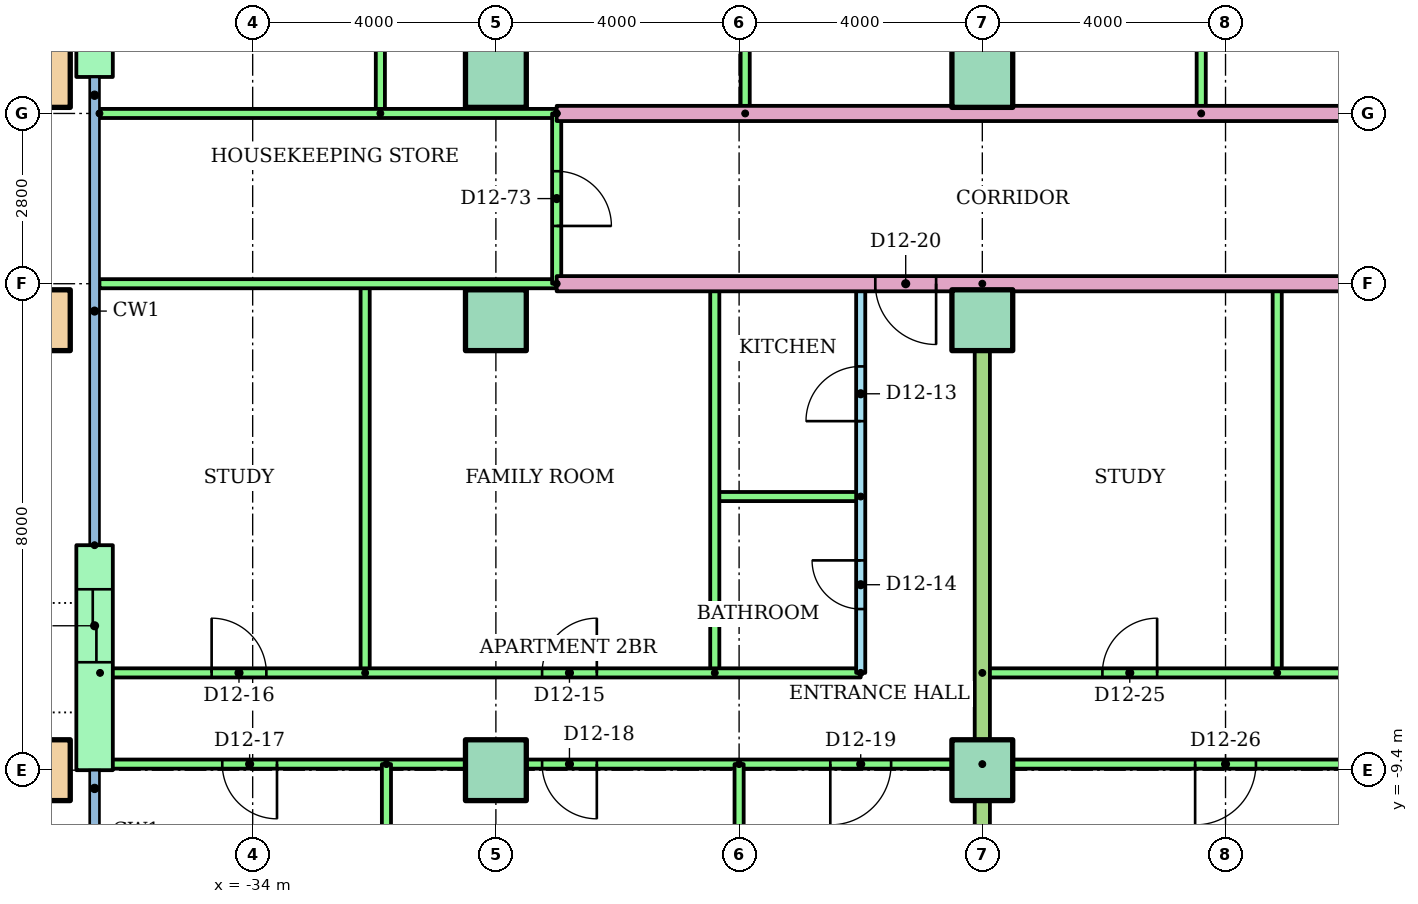
"""IFC4 building model, lengths in metres.
Left out: names, types, materials, properties, quantities, classifications, styles, units other than length and angle.
Written with IfcOpenShell. Run it as: python <this file> out.ifc"""

import sys

from ifc_helpers import new_model, si_unit, direction, frame, frame_2d, origin, origin_2d, place, context, subcontext, project, spatial, rectangle, hollow_rectangle, extrude, element, fill, save


model = new_model("IFC4")
c1 = context("Model", 3, precision=1e-05, world=origin(), true_north=direction((0.0, 1.0)))
c2 = subcontext(c1, "Body", "Model", "MODEL_VIEW")
j1 = project(units=[si_unit("LENGTHUNIT", "METRE"), si_unit("PLANEANGLEUNIT", "RADIAN")], contexts=[c1])
p1 = place(None, origin())
s1 = spatial("IfcSite", under=j1, at=p1, CompositionType="ELEMENT")
p2 = place(p1, origin())
s2 = spatial("IfcBuilding", under=s1, at=p2, CompositionType="ELEMENT")
p3 = place(p2, frame((0.0, 0.0, 48.0)))
s3 = spatial("IfcBuildingStorey", under=s2, at=p3, CompositionType="ELEMENT", Elevation=48.0)
p4 = place(p3, frame((-37.5, -9.4, 0.0)))
e1 = element("IfcColumn", 1, at=p4, inside=s3, PredefinedType="COLUMN", context=c2, shape_type="SweptSolid", body=[
    extrude(hollow_rectangle(XDim=1.0, YDim=1.0, WallThickness=0.05, at=origin_2d()), origin(), (0.0, 0.0, 1.0), 3.2),
])
for number, where in (
    (2, (-30.0, -9.4, 0.0)),
    (3, (-22.0, -9.4, 0.0)),
):
    element("IfcColumn", number, at=place(p3, frame(where)), inside=s3, PredefinedType="COLUMN", context=c2, shape_type="SweptSolid", body=[
        extrude(rectangle(XDim=1.0, YDim=1.0, at=origin_2d()), origin(), (0.0, 0.0, 1.0), 3.2),
    ])
p5 = place(p3, frame((-37.5, -2.0, 0.0)))
e4 = element("IfcColumn", 4, at=p5, inside=s3, PredefinedType="COLUMN", context=c2, shape_type="SweptSolid", body=[
    extrude(hollow_rectangle(XDim=1.0, YDim=1.0, WallThickness=0.05, at=origin_2d()), origin(), (0.0, 0.0, 1.0), 3.2),
])
for number, where in (
    (5, (-30.0, -2.0, 0.0)),
    (6, (-22.0, -2.0, 0.0)),
):
    element("IfcColumn", number, at=place(p3, frame(where)), inside=s3, PredefinedType="COLUMN", context=c2, shape_type="SweptSolid", body=[
        extrude(rectangle(XDim=1.0, YDim=1.0, at=origin_2d()), origin(), (0.0, 0.0, 1.0), 3.2),
    ])
p6 = place(p3, frame((-37.5, 2.0, 0.0)))
e7 = element("IfcColumn", 7, at=p6, inside=s3, PredefinedType="COLUMN", context=c2, shape_type="SweptSolid", body=[
    extrude(hollow_rectangle(XDim=1.0, YDim=1.0, WallThickness=0.05, at=origin_2d()), origin(), (0.0, 0.0, 1.0), 3.2),
])
for number, where in (
    (8, (-30.0, 2.0, 0.0)),
    (9, (-22.0, 2.0, 0.0)),
):
    element("IfcColumn", number, at=place(p3, frame(where)), inside=s3, PredefinedType="COLUMN", context=c2, shape_type="SweptSolid", body=[
        extrude(rectangle(XDim=1.0, YDim=1.0, at=origin_2d()), origin(), (0.0, 0.0, 1.0), 3.2),
    ])
p7 = place(p3, frame((-36.6, 6.5, 0.0), z_axis=(0.0, 0.0, 1.0), x_axis=(0.0, -1.0, 0.0)))
e10 = element("IfcWall", 10, at=p7, inside=s3, PredefinedType="STANDARD", context=c2, shape_type="SweptSolid", body=[
    extrude(rectangle(XDim=4.5, YDim=0.6, at=frame_2d((2.25, 0.0))), origin(), (0.0, 0.0, 1.0), 2.92),
])
p8 = place(p7, frame((1.65, 0.0, 0.0)))
e11 = element("IfcOpeningElement", 11, at=p8, cuts=e10, PredefinedType="OPENING", context=c2, shape_type="SweptSolid", body=[
    extrude(rectangle(XDim=1.2, YDim=2.1, at=frame_2d((0.6, 1.05))), frame((0.0, 0.31, 0.0), z_axis=(0.0, -1.0, 0.0), x_axis=(1.0, 0.0, 0.0)), (0.0, 0.0, 1.0), 0.62),
])
p9 = place(p3, frame((-36.6, -5.7, 0.0), z_axis=(0.0, 0.0, 1.0), x_axis=(0.0, -1.0, 0.0)))
e12 = element("IfcWall", 12, at=p9, inside=s3, PredefinedType="STANDARD", context=c2, shape_type="SweptSolid", body=[
    extrude(rectangle(XDim=3.7, YDim=0.6, at=frame_2d((1.85, 0.0))), origin(), (0.0, 0.0, 1.0), 2.92),
])
p10 = place(p9, frame((0.725, 0.0, 0.0)))
e13 = element("IfcOpeningElement", 13, at=p10, cuts=e12, PredefinedType="OPENING", context=c2, shape_type="SweptSolid", body=[
    extrude(rectangle(XDim=1.2, YDim=2.1, at=frame_2d((0.6, 1.05))), frame((0.0, 0.31, 0.0), z_axis=(0.0, -1.0, 0.0), x_axis=(1.0, 0.0, 0.0)), (0.0, 0.0, 1.0), 0.62),
])
p11 = place(p3, frame((-24.0, -7.8, 0.0), z_axis=(0.0, 0.0, 1.0), x_axis=(0.0, 1.0, 0.0)))
e14 = element("IfcWall", 14, at=p11, inside=s3, PredefinedType="PARTITIONING", context=c2, shape_type="SweptSolid", body=[
    extrude(rectangle(XDim=6.4, YDim=0.15, at=frame_2d((3.2, 0.0))), origin(), (0.0, 0.0, 1.0), 2.4),
])
p12 = place(p11, frame((4.14, 0.0, 0.0)))
e15 = element("IfcOpeningElement", 15, at=p12, cuts=e14, PredefinedType="OPENING", context=c2, shape_type="SweptSolid", body=[
    extrude(rectangle(XDim=0.9, YDim=2.1, at=frame_2d((0.45, 1.05))), frame((0.0, 0.085, 0.0), z_axis=(0.0, -1.0, 0.0), x_axis=(1.0, 0.0, 0.0)), (0.0, 0.0, 1.0), 0.17),
])
p13 = place(p11, frame((1.05, 0.0, 0.0)))
e16 = element("IfcOpeningElement", 16, at=p13, cuts=e14, PredefinedType="OPENING", context=c2, shape_type="SweptSolid", body=[
    extrude(rectangle(XDim=0.8, YDim=2.1, at=frame_2d((0.4, 1.05))), frame((0.0, 0.085, 0.0), z_axis=(0.0, -1.0, 0.0), x_axis=(1.0, 0.0, 0.0)), (0.0, 0.0, 1.0), 0.17),
])
p14 = place(p3, frame((-24.0, -4.9, 0.0), z_axis=(0.0, 0.0, 1.0), x_axis=(-1.0, 0.0, 0.0)))
e17 = element("IfcWall", 17, at=p14, inside=s3, PredefinedType="PARTITIONING", context=c2, shape_type="SweptSolid", body=[
    extrude(rectangle(XDim=2.4, YDim=0.15, at=frame_2d((1.2, 0.0))), origin(), (0.0, 0.0, 1.0), 2.4),
])
for number, where, z_axis, x_axis in (
    (18, (-26.4, -7.8, 0.0), (0.0, 0.0, 1.0), (0.0, 1.0, 0.0)),
    (19, (-32.15, -7.8, 0.0), (0.0, 0.0, 1.0), (0.0, 1.0, 0.0)),
):
    element("IfcWall", number, at=place(p3, frame(where, z_axis=z_axis, x_axis=x_axis)), inside=s3, PredefinedType="PARTITIONING", context=c2, shape_type="SweptSolid", body=[
        extrude(rectangle(XDim=6.4, YDim=0.15, at=frame_2d((3.2, 0.0))), origin(), (0.0, 0.0, 1.0), 2.4),
    ])
p15 = place(p3, frame((-36.51, -7.8, 0.0)))
e20 = element("IfcWall", 20, at=p15, inside=s3, PredefinedType="PARTITIONING", context=c2, shape_type="SweptSolid", body=[
    extrude(rectangle(XDim=12.51, YDim=0.15, at=frame_2d((6.255, 0.0))), origin(), (0.0, 0.0, 1.0), 2.4),
])
p16 = place(p15, frame((7.27, 0.0, 0.0)))
e21 = element("IfcOpeningElement", 21, at=p16, cuts=e20, PredefinedType="OPENING", context=c2, shape_type="SweptSolid", body=[
    extrude(rectangle(XDim=0.9, YDim=2.1, at=frame_2d((0.45, 1.05))), frame((0.0, 0.085, 0.0), z_axis=(0.0, -1.0, 0.0), x_axis=(1.0, 0.0, 0.0)), (0.0, 0.0, 1.0), 0.17),
])
p17 = place(p15, frame((1.835, 0.0, 0.0)))
e22 = element("IfcOpeningElement", 22, at=p17, cuts=e20, PredefinedType="OPENING", context=c2, shape_type="SweptSolid", body=[
    extrude(rectangle(XDim=0.9, YDim=2.1, at=frame_2d((0.45, 1.05))), frame((0.0, 0.085, 0.0), z_axis=(0.0, -1.0, 0.0), x_axis=(1.0, 0.0, 0.0)), (0.0, 0.0, 1.0), 0.17),
])
p18 = place(p3, frame((-22.0, -9.3, 0.0), z_axis=(0.0, 0.0, 1.0), x_axis=(-1.0, 0.0, 0.0)))
e23 = element("IfcWall", 23, at=p18, inside=s3, PredefinedType="PARTITIONING", context=c2, shape_type="SweptSolid", body=[
    extrude(rectangle(XDim=14.51, YDim=0.15, at=frame_2d((7.255, 0.0))), origin(), (0.0, 0.0, 1.0), 2.4),
])
p19 = place(p18, frame((11.6, 0.0, 0.0)))
e24 = element("IfcOpeningElement", 24, at=p19, cuts=e23, PredefinedType="OPENING", context=c2, shape_type="SweptSolid", body=[
    extrude(rectangle(XDim=0.9, YDim=2.1, at=frame_2d((0.45, 1.05))), frame((0.0, 0.085, 0.0), z_axis=(0.0, -1.0, 0.0), x_axis=(1.0, 0.0, 0.0)), (0.0, 0.0, 1.0), 0.17),
])
p20 = place(p18, frame((6.34, 0.0, 0.0)))
e25 = element("IfcOpeningElement", 25, at=p20, cuts=e23, PredefinedType="OPENING", context=c2, shape_type="SweptSolid", body=[
    extrude(rectangle(XDim=0.9, YDim=2.1, at=frame_2d((0.45, 1.05))), frame((0.0, 0.085, 0.0), z_axis=(0.0, -1.0, 0.0), x_axis=(1.0, 0.0, 0.0)), (0.0, 0.0, 1.0), 0.17),
])
p21 = place(p18, frame((1.5, 0.0, 0.0)))
e26 = element("IfcOpeningElement", 26, at=p21, cuts=e23, PredefinedType="OPENING", context=c2, shape_type="SweptSolid", body=[
    extrude(rectangle(XDim=1.0, YDim=2.1, at=frame_2d((0.5, 1.05))), frame((0.0, 0.085, 0.0), z_axis=(0.0, -1.0, 0.0), x_axis=(1.0, 0.0, 0.0)), (0.0, 0.0, 1.0), 0.17),
])
p22 = place(p3, frame((-31.8, -9.3, 0.0), z_axis=(0.0, 0.0, 1.0), x_axis=(0.0, -1.0, 0.0)))
e27 = element("IfcWall", 27, at=p22, inside=s3, PredefinedType="PARTITIONING", context=c2, shape_type="SweptSolid", body=[
    extrude(rectangle(XDim=5.02, YDim=0.15, at=frame_2d((2.51, 0.0))), origin(), (0.0, 0.0, 1.0), 2.4),
])
p23 = place(p3, frame((-26.0, -9.3, 0.0), z_axis=(0.0, 0.0, 1.0), x_axis=(0.0, -1.0, 0.0)))
e28 = element("IfcWall", 28, at=p23, inside=s3, PredefinedType="PARTITIONING", context=c2, shape_type="SweptSolid", body=[
    extrude(rectangle(XDim=6.821, YDim=0.15, at=frame_2d((3.411, 0.0))), origin(), (0.0, 0.0, 1.0), 2.4),
])
p24 = place(p3, frame((-17.15, -7.8, 0.0), z_axis=(0.0, 0.0, 1.0), x_axis=(0.0, 1.0, 0.0)))
e29 = element("IfcWall", 29, at=p24, inside=s3, PredefinedType="PARTITIONING", context=c2, shape_type="SweptSolid", body=[
    extrude(rectangle(XDim=6.4, YDim=0.15, at=frame_2d((3.2, 0.0))), origin(), (0.0, 0.0, 1.0), 2.4),
])
p25 = place(p3, frame((-22.0, -7.8, 0.0)))
e30 = element("IfcWall", 30, at=p25, inside=s3, PredefinedType="PARTITIONING", context=c2, shape_type="SweptSolid", body=[
    extrude(rectangle(XDim=22.0, YDim=0.15, at=frame_2d((11.0, 0.0))), origin(), (0.0, 0.0, 1.0), 2.4),
])
p26 = place(p25, frame((14.34, 0.0, 0.0)))
e31 = element("IfcOpeningElement", 31, at=p26, cuts=e30, PredefinedType="OPENING", context=c2, shape_type="SweptSolid", body=[
    extrude(rectangle(XDim=0.9, YDim=2.1, at=frame_2d((0.45, 1.05))), frame((0.0, 0.085, 0.0), z_axis=(0.0, -1.0, 0.0), x_axis=(1.0, 0.0, 0.0)), (0.0, 0.0, 1.0), 0.17),
])
p27 = place(p25, frame((8.76, 0.0, 0.0)))
e32 = element("IfcOpeningElement", 32, at=p27, cuts=e30, PredefinedType="OPENING", context=c2, shape_type="SweptSolid", body=[
    extrude(rectangle(XDim=0.9, YDim=2.1, at=frame_2d((0.45, 1.05))), frame((0.0, 0.085, 0.0), z_axis=(0.0, -1.0, 0.0), x_axis=(1.0, 0.0, 0.0)), (0.0, 0.0, 1.0), 0.17),
])
p28 = place(p25, frame((1.975, 0.0, 0.0)))
e33 = element("IfcOpeningElement", 33, at=p28, cuts=e30, PredefinedType="OPENING", context=c2, shape_type="SweptSolid", body=[
    extrude(rectangle(XDim=0.9, YDim=2.1, at=frame_2d((0.45, 1.05))), frame((0.0, 0.085, 0.0), z_axis=(0.0, -1.0, 0.0), x_axis=(1.0, 0.0, 0.0)), (0.0, 0.0, 1.0), 0.17),
])
p29 = place(p3, frame((2.0, -9.3, 0.0), z_axis=(0.0, 0.0, 1.0), x_axis=(-1.0, 0.0, 0.0)))
e34 = element("IfcWall", 34, at=p29, inside=s3, PredefinedType="PARTITIONING", context=c2, shape_type="SweptSolid", body=[
    extrude(rectangle(XDim=24.0, YDim=0.15, at=frame_2d((12.0, 0.0))), origin(), (0.0, 0.0, 1.0), 2.4),
])
p30 = place(p29, frame((19.5, 0.0, 0.0)))
e35 = element("IfcOpeningElement", 35, at=p30, cuts=e34, PredefinedType="OPENING", context=c2, shape_type="SweptSolid", body=[
    extrude(rectangle(XDim=1.0, YDim=2.1, at=frame_2d((0.5, 1.05))), frame((0.0, 0.085, 0.0), z_axis=(0.0, -1.0, 0.0), x_axis=(1.0, 0.0, 0.0)), (0.0, 0.0, 1.0), 0.17),
])
p31 = place(p29, frame((13.55, 0.0, 0.0)))
e36 = element("IfcOpeningElement", 36, at=p31, cuts=e34, PredefinedType="OPENING", context=c2, shape_type="SweptSolid", body=[
    extrude(rectangle(XDim=0.9, YDim=2.1, at=frame_2d((0.45, 1.05))), frame((0.0, 0.085, 0.0), z_axis=(0.0, -1.0, 0.0), x_axis=(1.0, 0.0, 0.0)), (0.0, 0.0, 1.0), 0.17),
])
p32 = place(p29, frame((9.55, 0.0, 0.0)))
e37 = element("IfcOpeningElement", 37, at=p32, cuts=e34, PredefinedType="OPENING", context=c2, shape_type="SweptSolid", body=[
    extrude(rectangle(XDim=0.9, YDim=2.1, at=frame_2d((0.45, 1.05))), frame((0.0, 0.085, 0.0), z_axis=(0.0, -1.0, 0.0), x_axis=(1.0, 0.0, 0.0)), (0.0, 0.0, 1.0), 0.17),
])
p33 = place(p29, frame((5.55, 0.0, 0.0)))
e38 = element("IfcOpeningElement", 38, at=p33, cuts=e34, PredefinedType="OPENING", context=c2, shape_type="SweptSolid", body=[
    extrude(rectangle(XDim=0.9, YDim=2.1, at=frame_2d((0.45, 1.05))), frame((0.0, 0.085, 0.0), z_axis=(0.0, -1.0, 0.0), x_axis=(1.0, 0.0, 0.0)), (0.0, 0.0, 1.0), 0.17),
])
p34 = place(p29, frame((1.55, 0.0, 0.0)))
e39 = element("IfcOpeningElement", 39, at=p34, cuts=e34, PredefinedType="OPENING", context=c2, shape_type="SweptSolid", body=[
    extrude(rectangle(XDim=0.9, YDim=2.1, at=frame_2d((0.45, 1.05))), frame((0.0, 0.085, 0.0), z_axis=(0.0, -1.0, 0.0), x_axis=(1.0, 0.0, 0.0)), (0.0, 0.0, 1.0), 0.17),
])
p35 = place(p3, frame((-22.0, -1.4, 0.0), z_axis=(0.0, 0.0, 1.0), x_axis=(0.0, -1.0, 0.0)))
e40 = element("IfcWall", 40, at=p35, inside=s3, PredefinedType="PARTITIONING", context=c2, shape_type="SweptSolid", body=[
    extrude(rectangle(XDim=14.71, YDim=0.25, at=frame_2d((7.355, 0.0))), origin(), (0.0, 0.0, 1.0), 2.4),
])
p36 = place(p3, frame((-14.0, -1.4, 0.0), z_axis=(0.0, 0.0, 1.0), x_axis=(-1.0, 0.0, 0.0)))
e41 = element("IfcWall", 41, at=p36, inside=s3, PredefinedType="PARTITIONING", context=c2, shape_type="SweptSolid", body=[
    extrude(rectangle(XDim=15.0, YDim=0.25, at=frame_2d((7.5, 0.0))), origin(), (0.0, 0.0, 1.0), 2.4),
])
p37 = place(p36, frame((8.76, 0.0, 0.0)))
e42 = element("IfcOpeningElement", 42, at=p37, cuts=e41, PredefinedType="OPENING", context=c2, shape_type="SweptSolid", body=[
    extrude(rectangle(XDim=1.0, YDim=2.1, at=frame_2d((0.5, 1.05))), frame((0.0, 0.135, 0.0), z_axis=(0.0, -1.0, 0.0), x_axis=(1.0, 0.0, 0.0)), (0.0, 0.0, 1.0), 0.27),
])
p38 = place(p3, frame((-29.0, -1.4, 0.0), z_axis=(0.0, 0.0, 1.0), x_axis=(-1.0, 0.0, 0.0)))
e43 = element("IfcWall", 43, at=p38, inside=s3, PredefinedType="PARTITIONING", context=c2, shape_type="SweptSolid", body=[
    extrude(rectangle(XDim=7.52, YDim=0.15, at=frame_2d((3.76, 0.0))), origin(), (0.0, 0.0, 1.0), 2.4),
])
for number, where, z_axis, x_axis in (
    (44, (-18.4, 1.4, 0.0), (0.0, 0.0, 1.0), (0.0, 1.0, 0.0)),
    (45, (-25.9, 1.4, 0.0), (0.0, 0.0, 1.0), (0.0, 1.0, 0.0)),
    (46, (-31.9, 1.4, 0.0), (0.0, 0.0, 1.0), (0.0, 1.0, 0.0)),
):
    element("IfcWall", number, at=place(p3, frame(where, z_axis=z_axis, x_axis=x_axis)), inside=s3, PredefinedType="PARTITIONING", context=c2, shape_type="SweptSolid", body=[
        extrude(rectangle(XDim=8.8, YDim=0.15, at=frame_2d((4.4, 0.0))), origin(), (0.0, 0.0, 1.0), 2.4),
    ])
p39 = place(p3, frame((-29.0, 1.4, 0.0)))
e47 = element("IfcWall", 47, at=p39, inside=s3, PredefinedType="PARTITIONING", context=c2, shape_type="SweptSolid", body=[
    extrude(rectangle(XDim=15.0, YDim=0.25, at=frame_2d((7.5, 0.0))), origin(), (0.0, 0.0, 1.0), 2.4),
])
p40 = place(p39, frame((13.5, 0.0, 0.0)))
e48 = element("IfcOpeningElement", 48, at=p40, cuts=e47, PredefinedType="OPENING", context=c2, shape_type="SweptSolid", body=[
    extrude(rectangle(XDim=1.0, YDim=2.1, at=frame_2d((0.5, 1.05))), frame((0.0, 0.135, 0.0), z_axis=(0.0, -1.0, 0.0), x_axis=(1.0, 0.0, 0.0)), (0.0, 0.0, 1.0), 0.27),
])
p41 = place(p3, frame((-36.52, 1.4, 0.0)))
e49 = element("IfcWall", 49, at=p41, inside=s3, PredefinedType="PARTITIONING", context=c2, shape_type="SweptSolid", body=[
    extrude(rectangle(XDim=7.52, YDim=0.15, at=frame_2d((3.76, 0.0))), origin(), (0.0, 0.0, 1.0), 2.4),
])
p42 = place(p3, frame((-29.0, 1.4, 0.0), z_axis=(0.0, 0.0, 1.0), x_axis=(0.0, -1.0, 0.0)))
e50 = element("IfcWall", 50, at=p42, inside=s3, PredefinedType="PARTITIONING", context=c2, shape_type="SweptSolid", body=[
    extrude(rectangle(XDim=2.8, YDim=0.15, at=frame_2d((1.4, 0.0))), origin(), (0.0, 0.0, 1.0), 2.4),
])
p43 = place(p42, frame((0.95, 0.0, 0.0)))
e51 = element("IfcOpeningElement", 51, at=p43, cuts=e50, PredefinedType="OPENING", context=c2, shape_type="SweptSolid", body=[
    extrude(rectangle(XDim=0.9, YDim=2.1, at=frame_2d((0.45, 1.05))), frame((0.0, 0.085, 0.0), z_axis=(0.0, -1.0, 0.0), x_axis=(1.0, 0.0, 0.0)), (0.0, 0.0, 1.0), 0.17),
])
p44 = place(p12, origin())
e52 = element("IfcDoor", 52, at=p44, inside=s3, OperationType="SINGLE_SWING_LEFT", PredefinedType="DOOR", context=c2, shape_type="SweptSolid", body=[
    extrude(rectangle(XDim=0.9, YDim=2.1, at=frame_2d((0.45, 1.05))), frame((0.0, 0.025, 0.0), z_axis=(0.0, -1.0, 0.0), x_axis=(1.0, 0.0, 0.0)), (0.0, 0.0, 1.0), 0.05),
])
fill(e15, e52)
p45 = place(p13, origin())
e53 = element("IfcDoor", 53, at=p45, inside=s3, OperationType="SINGLE_SWING_RIGHT", PredefinedType="DOOR", context=c2, shape_type="SweptSolid", body=[
    extrude(rectangle(XDim=0.8, YDim=2.1, at=frame_2d((0.4, 1.05))), frame((0.0, 0.025, 0.0), z_axis=(0.0, -1.0, 0.0), x_axis=(1.0, 0.0, 0.0)), (0.0, 0.0, 1.0), 0.05),
])
fill(e16, e53)
p46 = place(p16, origin())
e54 = element("IfcDoor", 54, at=p46, inside=s3, OperationType="SINGLE_SWING_RIGHT", PredefinedType="DOOR", context=c2, shape_type="SweptSolid", body=[
    extrude(rectangle(XDim=0.9, YDim=2.1, at=frame_2d((0.45, 1.05))), frame((0.0, 0.025, 0.0), z_axis=(0.0, -1.0, 0.0), x_axis=(1.0, 0.0, 0.0)), (0.0, 0.0, 1.0), 0.05),
])
fill(e21, e54)
p47 = place(p17, origin())
e55 = element("IfcDoor", 55, at=p47, inside=s3, OperationType="SINGLE_SWING_LEFT", PredefinedType="DOOR", context=c2, shape_type="SweptSolid", body=[
    extrude(rectangle(XDim=0.9, YDim=2.1, at=frame_2d((0.45, 1.05))), frame((0.0, 0.025, 0.0), z_axis=(0.0, -1.0, 0.0), x_axis=(1.0, 0.0, 0.0)), (0.0, 0.0, 1.0), 0.05),
])
fill(e22, e55)
p48 = place(p19, origin())
e56 = element("IfcDoor", 56, at=p48, inside=s3, OperationType="SINGLE_SWING_LEFT", PredefinedType="DOOR", context=c2, shape_type="SweptSolid", body=[
    extrude(rectangle(XDim=0.9, YDim=2.1, at=frame_2d((0.45, 1.05))), frame((0.0, 0.025, 0.0), z_axis=(0.0, -1.0, 0.0), x_axis=(1.0, 0.0, 0.0)), (0.0, 0.0, 1.0), 0.05),
])
fill(e24, e56)
p49 = place(p20, origin())
e57 = element("IfcDoor", 57, at=p49, inside=s3, OperationType="SINGLE_SWING_LEFT", PredefinedType="DOOR", context=c2, shape_type="SweptSolid", body=[
    extrude(rectangle(XDim=0.9, YDim=2.1, at=frame_2d((0.45, 1.05))), frame((0.0, 0.025, 0.0), z_axis=(0.0, -1.0, 0.0), x_axis=(1.0, 0.0, 0.0)), (0.0, 0.0, 1.0), 0.05),
])
fill(e25, e57)
p50 = place(p21, origin())
e58 = element("IfcDoor", 58, at=p50, inside=s3, OperationType="SINGLE_SWING_RIGHT", PredefinedType="DOOR", context=c2, shape_type="SweptSolid", body=[
    extrude(rectangle(XDim=1.0, YDim=2.1, at=frame_2d((0.5, 1.05))), frame((0.0, 0.025, 0.0), z_axis=(0.0, -1.0, 0.0), x_axis=(1.0, 0.0, 0.0)), (0.0, 0.0, 1.0), 0.05),
])
fill(e26, e58)
p51 = place(p37, origin())
e59 = element("IfcDoor", 59, at=p51, inside=s3, OperationType="SINGLE_SWING_LEFT", PredefinedType="DOOR", context=c2, shape_type="SweptSolid", body=[
    extrude(rectangle(XDim=1.0, YDim=2.1, at=frame_2d((0.5, 1.05))), frame((0.0, 0.025, 0.0), z_axis=(0.0, -1.0, 0.0), x_axis=(1.0, 0.0, 0.0)), (0.0, 0.0, 1.0), 0.05),
])
fill(e42, e59)
p52 = place(p28, origin())
e60 = element("IfcDoor", 60, at=p52, inside=s3, OperationType="SINGLE_SWING_RIGHT", PredefinedType="DOOR", context=c2, shape_type="SweptSolid", body=[
    extrude(rectangle(XDim=0.9, YDim=2.1, at=frame_2d((0.45, 1.05))), frame((0.0, 0.025, 0.0), z_axis=(0.0, -1.0, 0.0), x_axis=(1.0, 0.0, 0.0)), (0.0, 0.0, 1.0), 0.05),
])
fill(e33, e60)
p53 = place(p30, origin())
e61 = element("IfcDoor", 61, at=p53, inside=s3, OperationType="SINGLE_SWING_RIGHT", PredefinedType="DOOR", context=c2, shape_type="SweptSolid", body=[
    extrude(rectangle(XDim=1.0, YDim=2.1, at=frame_2d((0.5, 1.05))), frame((0.0, 0.025, 0.0), z_axis=(0.0, -1.0, 0.0), x_axis=(1.0, 0.0, 0.0)), (0.0, 0.0, 1.0), 0.05),
])
fill(e35, e61)
p54 = place(p43, origin())
e62 = element("IfcDoor", 62, at=p54, inside=s3, OperationType="SINGLE_SWING_RIGHT", PredefinedType="DOOR", context=c2, shape_type="SweptSolid", body=[
    extrude(rectangle(XDim=0.9, YDim=2.1, at=frame_2d((0.45, 1.05))), frame((0.0, 0.025, 0.0), z_axis=(0.0, -1.0, 0.0), x_axis=(1.0, 0.0, 0.0)), (0.0, 0.0, 1.0), 0.05),
])
fill(e51, e62)
p55 = place(p10, origin())
e63 = element("IfcDoor", 63, at=p55, inside=s3, OperationType="SLIDING_TO_LEFT", PredefinedType="DOOR", context=c2, shape_type="SweptSolid", body=[
    extrude(rectangle(XDim=1.2, YDim=2.1, at=frame_2d((0.6, 1.05))), frame((0.0, 0.025, 0.0), z_axis=(0.0, -1.0, 0.0), x_axis=(1.0, 0.0, 0.0)), (0.0, 0.0, 1.0), 0.05),
])
fill(e13, e63)
save(model, sys.argv[1])
